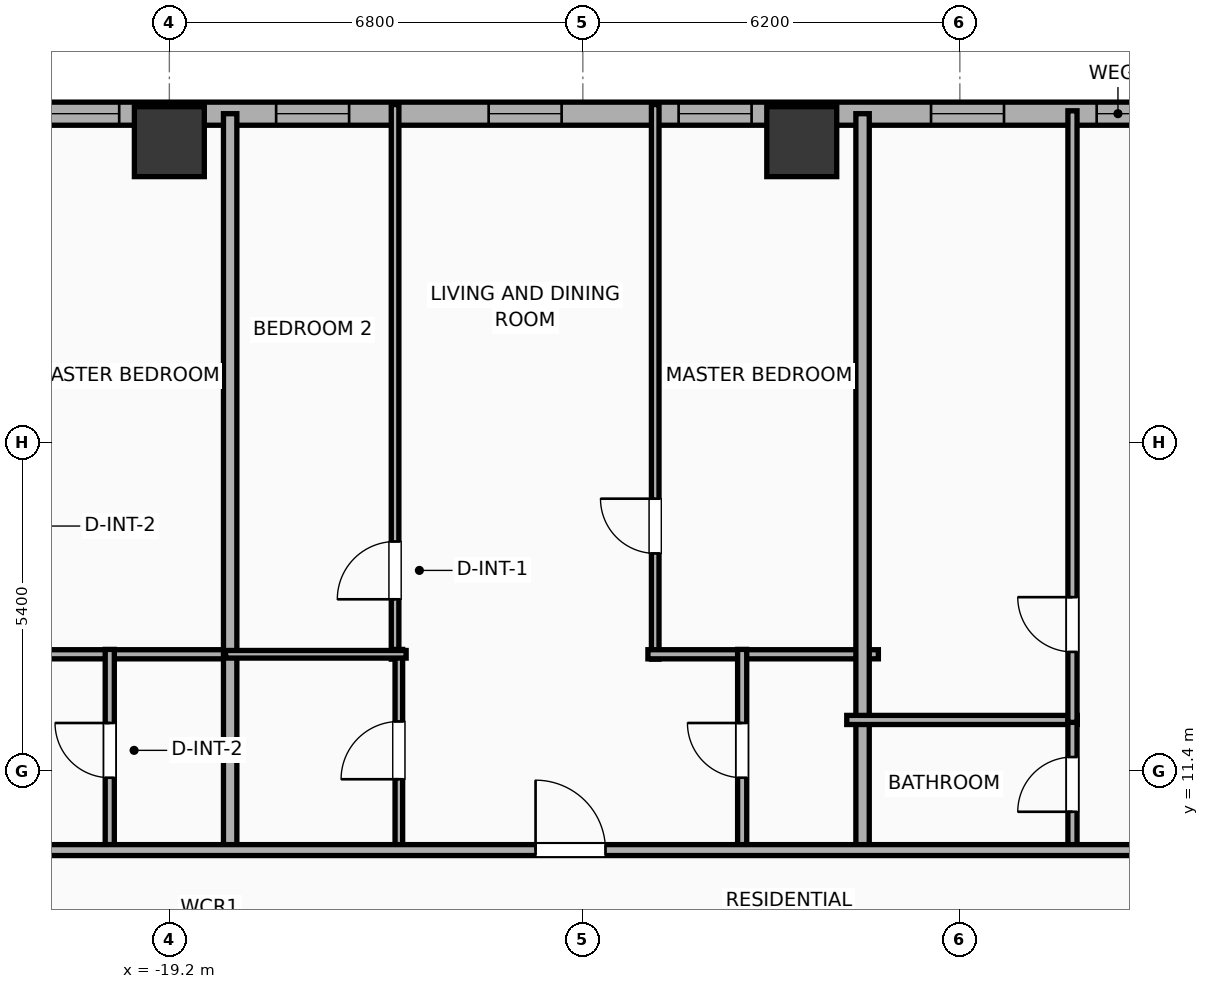
"""IFC4 building model, lengths in metres.
Left out: names, types, materials, properties, quantities, classifications, styles, units other than length and angle.
Written with IfcOpenShell. Run it as: python <this file> out.ifc"""

import sys

from ifc_helpers import new_model, si_unit, direction, frame, frame_2d, origin, origin_2d, place, context, subcontext, project, spatial, rectangle, hollow_rectangle, extrude, element, fill, save


model = new_model("IFC4")
c1 = context("Model", 3, precision=1e-05, world=origin(), true_north=direction((0.0, 1.0)))
c2 = subcontext(c1, "Body", "Model", "MODEL_VIEW")
j1 = project(units=[si_unit("LENGTHUNIT", "METRE"), si_unit("PLANEANGLEUNIT", "RADIAN")], contexts=[c1])
p1 = place(None, origin())
s1 = spatial("IfcSite", under=j1, at=p1, CompositionType="ELEMENT")
p2 = place(p1, origin())
s2 = spatial("IfcBuilding", under=s1, at=p2, CompositionType="ELEMENT")
p3 = place(p2, frame((0.0, 0.0, 37.7)))
s3 = spatial("IfcBuildingStorey", under=s2, at=p3, CompositionType="ELEMENT", Elevation=37.7)
for number, where, z_axis, x_axis in (
    (1, (-8.8, 21.75, 0.0), (0.0, 0.0, 1.0), (1.0, 0.0, 0.0)),
    (2, (-19.2, 21.75, 0.0), (0.0, 0.0, 1.0), (1.0, 0.0, 0.0)),
):
    element("IfcColumn", number, at=place(p3, frame(where, z_axis=z_axis, x_axis=x_axis)), inside=s3, PredefinedType="COLUMN", context=c2, shape_type="SweptSolid", body=[
        extrude(hollow_rectangle(XDim=1.15, YDim=1.15, WallThickness=0.04, at=origin_2d()), origin(), (0.0, 0.0, 1.0), 3.9),
    ])
p4 = place(p3, frame((-29.581, 22.21, 0.0), z_axis=(0.0, 0.0, 1.0), x_axis=(1.0, 0.0, 0.0)))
e3 = element("IfcWall", 3, at=p4, inside=s3, PredefinedType="ELEMENTEDWALL", context=c2, shape_type="SweptSolid", body=[
    extrude(rectangle(XDim=51.963, YDim=0.38, at=frame_2d((25.981, 0.0))), origin(), (0.0, 0.0, 1.0), 3.65),
])
p5 = place(p4, frame((25.631, 0.0, 0.75)))
e4 = element("IfcOpeningElement", 4, at=p5, cuts=e3, PredefinedType="OPENING", context=c2, shape_type="SweptSolid", body=[
    extrude(rectangle(XDim=2.4, YDim=2.1, at=frame_2d((1.2, 1.05))), frame((0.0, 0.2, 0.0), z_axis=(0.0, -1.0, 0.0), x_axis=(1.0, 0.0, 0.0)), (0.0, 0.0, 1.0), 0.4),
])
p6 = place(p4, frame((42.952, 0.0, 0.75)))
e5 = element("IfcOpeningElement", 5, at=p6, cuts=e3, PredefinedType="OPENING", context=c2, shape_type="SweptSolid", body=[
    extrude(rectangle(XDim=2.4, YDim=2.1, at=frame_2d((1.2, 1.05))), frame((0.0, 0.2, 0.0), z_axis=(0.0, -1.0, 0.0), x_axis=(1.0, 0.0, 0.0)), (0.0, 0.0, 1.0), 0.4),
])
p7 = place(p4, frame((1.731, 0.0, 0.75)))
e6 = element("IfcOpeningElement", 6, at=p7, cuts=e3, PredefinedType="OPENING", context=c2, shape_type="SweptSolid", body=[
    extrude(rectangle(XDim=1.2, YDim=2.05, at=frame_2d((0.6, 1.025))), frame((0.0, 0.2, 0.0), z_axis=(0.0, -1.0, 0.0), x_axis=(1.0, 0.0, 0.0)), (0.0, 0.0, 1.0), 0.4),
])
p8 = place(p4, frame((5.272, 0.0, 0.75)))
e7 = element("IfcOpeningElement", 7, at=p8, cuts=e3, PredefinedType="OPENING", context=c2, shape_type="SweptSolid", body=[
    extrude(rectangle(XDim=1.2, YDim=2.05, at=frame_2d((0.6, 1.025))), frame((0.0, 0.2, 0.0), z_axis=(0.0, -1.0, 0.0), x_axis=(1.0, 0.0, 0.0)), (0.0, 0.0, 1.0), 0.4),
])
p9 = place(p4, frame((8.356, 0.0, 0.75)))
e8 = element("IfcOpeningElement", 8, at=p9, cuts=e3, PredefinedType="OPENING", context=c2, shape_type="SweptSolid", body=[
    extrude(rectangle(XDim=1.2, YDim=2.05, at=frame_2d((0.6, 1.025))), frame((0.0, 0.2, 0.0), z_axis=(0.0, -1.0, 0.0), x_axis=(1.0, 0.0, 0.0)), (0.0, 0.0, 1.0), 0.4),
])
p10 = place(p4, frame((15.632, 0.0, 0.75)))
e9 = element("IfcOpeningElement", 9, at=p10, cuts=e3, PredefinedType="OPENING", context=c2, shape_type="SweptSolid", body=[
    extrude(rectangle(XDim=1.2, YDim=2.05, at=frame_2d((0.6, 1.025))), frame((0.0, 0.2, 0.0), z_axis=(0.0, -1.0, 0.0), x_axis=(1.0, 0.0, 0.0)), (0.0, 0.0, 1.0), 0.4),
])
p11 = place(p4, frame((12.137, 0.0, 0.75)))
e10 = element("IfcOpeningElement", 10, at=p11, cuts=e3, PredefinedType="OPENING", context=c2, shape_type="SweptSolid", body=[
    extrude(rectangle(XDim=1.2, YDim=2.05, at=frame_2d((0.6, 1.025))), frame((0.0, 0.2, 0.0), z_axis=(0.0, -1.0, 0.0), x_axis=(1.0, 0.0, 0.0)), (0.0, 0.0, 1.0), 0.4),
])
p12 = place(p4, frame((18.756, 0.0, 0.75)))
e11 = element("IfcOpeningElement", 11, at=p12, cuts=e3, PredefinedType="OPENING", context=c2, shape_type="SweptSolid", body=[
    extrude(rectangle(XDim=1.2, YDim=2.05, at=frame_2d((0.6, 1.025))), frame((0.0, 0.2, 0.0), z_axis=(0.0, -1.0, 0.0), x_axis=(1.0, 0.0, 0.0)), (0.0, 0.0, 1.0), 0.4),
])
p13 = place(p4, frame((22.907, 0.0, 0.75)))
e12 = element("IfcOpeningElement", 12, at=p13, cuts=e3, PredefinedType="OPENING", context=c2, shape_type="SweptSolid", body=[
    extrude(rectangle(XDim=1.2, YDim=2.05, at=frame_2d((0.6, 1.025))), frame((0.0, 0.2, 0.0), z_axis=(0.0, -1.0, 0.0), x_axis=(1.0, 0.0, 0.0)), (0.0, 0.0, 1.0), 0.4),
])
p14 = place(p4, frame((36.381, 0.0, 0.75)))
e13 = element("IfcOpeningElement", 13, at=p14, cuts=e3, PredefinedType="OPENING", context=c2, shape_type="SweptSolid", body=[
    extrude(rectangle(XDim=1.2, YDim=2.05, at=frame_2d((0.6, 1.025))), frame((0.0, 0.2, 0.0), z_axis=(0.0, -1.0, 0.0), x_axis=(1.0, 0.0, 0.0)), (0.0, 0.0, 1.0), 0.4),
])
p15 = place(p4, frame((32.886, 0.0, 0.75)))
e14 = element("IfcOpeningElement", 14, at=p15, cuts=e3, PredefinedType="OPENING", context=c2, shape_type="SweptSolid", body=[
    extrude(rectangle(XDim=1.2, YDim=2.05, at=frame_2d((0.6, 1.025))), frame((0.0, 0.2, 0.0), z_axis=(0.0, -1.0, 0.0), x_axis=(1.0, 0.0, 0.0)), (0.0, 0.0, 1.0), 0.4),
])
p16 = place(p4, frame((39.556, 0.0, 0.75)))
e15 = element("IfcOpeningElement", 15, at=p16, cuts=e3, PredefinedType="OPENING", context=c2, shape_type="SweptSolid", body=[
    extrude(rectangle(XDim=1.2, YDim=2.05, at=frame_2d((0.6, 1.025))), frame((0.0, 0.2, 0.0), z_axis=(0.0, -1.0, 0.0), x_axis=(1.0, 0.0, 0.0)), (0.0, 0.0, 1.0), 0.4),
])
p17 = place(p4, frame((46.885, 0.0, 0.75)))
e16 = element("IfcOpeningElement", 16, at=p17, cuts=e3, PredefinedType="OPENING", context=c2, shape_type="SweptSolid", body=[
    extrude(rectangle(XDim=1.2, YDim=2.05, at=frame_2d((0.6, 1.025))), frame((0.0, 0.2, 0.0), z_axis=(0.0, -1.0, 0.0), x_axis=(1.0, 0.0, 0.0)), (0.0, 0.0, 1.0), 0.4),
])
p18 = place(p4, frame((49.531, 0.0, 0.75)))
e17 = element("IfcOpeningElement", 17, at=p18, cuts=e3, PredefinedType="OPENING", context=c2, shape_type="SweptSolid", body=[
    extrude(rectangle(XDim=1.2, YDim=2.05, at=frame_2d((0.6, 1.025))), frame((0.0, 0.2, 0.0), z_axis=(0.0, -1.0, 0.0), x_axis=(1.0, 0.0, 0.0)), (0.0, 0.0, 1.0), 0.4),
])
p19 = place(p3, frame((-21.73, 13.32, 0.0), z_axis=(0.0, 0.0, 1.0), x_axis=(1.0, 0.0, 0.0)))
e18 = element("IfcWall", 18, at=p19, inside=s3, PredefinedType="PLUMBINGWALL", context=c2, shape_type="SweptSolid", body=[
    extrude(rectangle(XDim=3.605, YDim=0.15, at=frame_2d((1.802, 0.0))), origin(), (0.0, 0.0, 1.0), 3.65),
])
p20 = place(p3, frame((-20.18, 10.08, 0.0), z_axis=(0.0, 0.0, 1.0), x_axis=(0.0, 1.0, 0.0)))
e19 = element("IfcWall", 19, at=p20, inside=s3, PredefinedType="PLUMBINGWALL", context=c2, shape_type="SweptSolid", body=[
    extrude(rectangle(XDim=3.32, YDim=0.15, at=frame_2d((1.66, 0.0))), origin(), (0.0, 0.0, 1.0), 3.65),
])
p21 = place(p20, frame((1.21, 0.0, 0.0)))
e20 = element("IfcOpeningElement", 20, at=p21, cuts=e19, PredefinedType="OPENING", context=c2, shape_type="SweptSolid", body=[
    extrude(rectangle(XDim=0.9, YDim=2.05, at=frame_2d((0.45, 1.025))), frame((0.0, 0.085, 0.0), z_axis=(0.0, -1.0, 0.0), x_axis=(1.0, 0.0, 0.0)), (0.0, 0.0, 1.0), 0.17),
])
p22 = place(p3, frame((-18.2, 10.02, 0.0), z_axis=(0.0, 0.0, 1.0), x_axis=(0.0, 1.0, 0.0)))
e21 = element("IfcWall", 21, at=p22, inside=s3, PredefinedType="PARTITIONING", context=c2, shape_type="SweptSolid", body=[
    extrude(rectangle(XDim=12.19, YDim=0.22, at=frame_2d((6.095, 0.0))), origin(), (0.0, 0.0, 1.0), 3.65),
])
p23 = place(p3, frame((-15.488, 13.24, 0.0), z_axis=(0.0, 0.0, 1.0), x_axis=(0.0, 1.0, 0.0)))
e22 = element("IfcWall", 22, at=p23, inside=s3, PredefinedType="PARTITIONING", context=c2, shape_type="SweptSolid", body=[
    extrude(rectangle(XDim=9.12, YDim=0.125, at=frame_2d((4.56, 0.0))), origin(), (0.0, 0.0, 1.0), 3.65),
])
p24 = place(p23, frame((0.984, 0.0, 0.0)))
e23 = element("IfcOpeningElement", 23, at=p24, cuts=e22, PredefinedType="OPENING", context=c2, shape_type="SweptSolid", body=[
    extrude(rectangle(XDim=0.95, YDim=2.05, at=frame_2d((0.475, 1.025))), frame((0.0, 0.073, 0.0), z_axis=(0.0, -1.0, 0.0), x_axis=(1.0, 0.0, 0.0)), (0.0, 0.0, 1.0), 0.145),
])
p25 = place(p3, frame((-11.21, 13.24, 0.0), z_axis=(0.0, 0.0, 1.0), x_axis=(0.0, 1.0, 0.0)))
e24 = element("IfcWall", 24, at=p25, inside=s3, PredefinedType="PARTITIONING", context=c2, shape_type="SweptSolid", body=[
    extrude(rectangle(XDim=9.12, YDim=0.125, at=frame_2d((4.56, 0.0))), origin(), (0.0, 0.0, 1.0), 3.65),
])
p26 = place(p25, frame((1.739, 0.0, 0.0)))
e25 = element("IfcOpeningElement", 25, at=p26, cuts=e24, PredefinedType="OPENING", context=c2, shape_type="SweptSolid", body=[
    extrude(rectangle(XDim=0.9, YDim=2.05, at=frame_2d((0.45, 1.025))), frame((0.0, 0.073, 0.0), z_axis=(0.0, -1.0, 0.0), x_axis=(1.0, 0.0, 0.0)), (0.0, 0.0, 1.0), 0.145),
])
p27 = place(p3, frame((-11.33, 13.32, 0.0), z_axis=(0.0, 0.0, 1.0), x_axis=(1.0, 0.0, 0.0)))
e26 = element("IfcWall", 26, at=p27, inside=s3, PredefinedType="PLUMBINGWALL", context=c2, shape_type="SweptSolid", body=[
    extrude(rectangle(XDim=3.79, YDim=0.15, at=frame_2d((1.895, 0.0))), origin(), (0.0, 0.0, 1.0), 3.65),
])
p28 = place(p3, frame((-15.426, 10.08, 0.0), z_axis=(0.0, 0.0, 1.0), x_axis=(0.0, 1.0, 0.0)))
e27 = element("IfcWall", 27, at=p28, inside=s3, PredefinedType="PARTITIONING", context=c2, shape_type="SweptSolid", body=[
    extrude(rectangle(XDim=3.32, YDim=0.125, at=frame_2d((1.66, 0.0))), origin(), (0.0, 0.0, 1.0), 3.65),
])
p29 = place(p28, frame((1.185, 0.0, 0.0)))
e28 = element("IfcOpeningElement", 28, at=p29, cuts=e27, PredefinedType="OPENING", context=c2, shape_type="SweptSolid", body=[
    extrude(rectangle(XDim=0.95, YDim=2.05, at=frame_2d((0.475, 1.025))), frame((0.0, 0.073, 0.0), z_axis=(0.0, -1.0, 0.0), x_axis=(1.0, 0.0, 0.0)), (0.0, 0.0, 1.0), 0.145),
])
p30 = place(p3, frame((-18.275, 13.32, 0.0), z_axis=(0.0, 0.0, 1.0), x_axis=(1.0, 0.0, 0.0)))
e29 = element("IfcWall", 29, at=p30, inside=s3, PredefinedType="PARTITIONING", context=c2, shape_type="SweptSolid", body=[
    extrude(rectangle(XDim=2.969, YDim=0.125, at=frame_2d((1.484, 0.0))), origin(), (0.0, 0.0, 1.0), 3.65),
])
p31 = place(p3, frame((-9.78, 10.08, 0.0), z_axis=(0.0, 0.0, 1.0), x_axis=(0.0, 1.0, 0.0)))
e30 = element("IfcWall", 30, at=p31, inside=s3, PredefinedType="PLUMBINGWALL", context=c2, shape_type="SweptSolid", body=[
    extrude(rectangle(XDim=3.32, YDim=0.15, at=frame_2d((1.66, 0.0))), origin(), (0.0, 0.0, 1.0), 3.65),
])
p32 = place(p31, frame((1.21, 0.0, 0.0)))
e31 = element("IfcOpeningElement", 31, at=p32, cuts=e30, PredefinedType="OPENING", context=c2, shape_type="SweptSolid", body=[
    extrude(rectangle(XDim=0.9, YDim=2.05, at=frame_2d((0.45, 1.025))), frame((0.0, 0.085, 0.0), z_axis=(0.0, -1.0, 0.0), x_axis=(1.0, 0.0, 0.0)), (0.0, 0.0, 1.0), 0.17),
])
p33 = place(p3, frame((-7.8, 10.02, 0.0), z_axis=(0.0, 0.0, 1.0), x_axis=(0.0, 1.0, 0.0)))
e32 = element("IfcWall", 32, at=p33, inside=s3, PredefinedType="PARTITIONING", context=c2, shape_type="SweptSolid", body=[
    extrude(rectangle(XDim=12.19, YDim=0.22, at=frame_2d((6.095, 0.0))), origin(), (0.0, 0.0, 1.0), 3.65),
])
p34 = place(p3, frame((-8.06, 12.24, 0.0), z_axis=(0.0, 0.0, 1.0), x_axis=(1.0, 0.0, 0.0)))
e33 = element("IfcWall", 33, at=p34, inside=s3, PredefinedType="PLUMBINGWALL", context=c2, shape_type="SweptSolid", body=[
    extrude(rectangle(XDim=3.792, YDim=0.15, at=frame_2d((1.896, 0.0))), origin(), (0.0, 0.0, 1.0), 3.65),
])
p35 = place(p3, frame((-4.348, 10.08, 0.0), z_axis=(0.0, 0.0, 1.0), x_axis=(0.0, 1.0, 0.0)))
e34 = element("IfcWall", 34, at=p35, inside=s3, PredefinedType="PLUMBINGWALL", context=c2, shape_type="SweptSolid", body=[
    extrude(rectangle(XDim=2.2, YDim=0.15, at=frame_2d((1.1, 0.0))), origin(), (0.0, 0.0, 1.0), 3.65),
])
p36 = place(p35, frame((0.65, 0.0, 0.0)))
e35 = element("IfcOpeningElement", 35, at=p36, cuts=e34, PredefinedType="OPENING", context=c2, shape_type="SweptSolid", body=[
    extrude(rectangle(XDim=0.9, YDim=2.05, at=frame_2d((0.45, 1.025))), frame((0.0, 0.085, 0.0), z_axis=(0.0, -1.0, 0.0), x_axis=(1.0, 0.0, 0.0)), (0.0, 0.0, 1.0), 0.17),
])
p37 = place(p3, frame((-4.348, 12.2, 0.0), z_axis=(0.0, 0.0, 1.0), x_axis=(0.0, 1.0, 0.0)))
e36 = element("IfcWall", 36, at=p37, inside=s3, PredefinedType="PLUMBINGWALL", context=c2, shape_type="SweptSolid", body=[
    extrude(rectangle(XDim=10.058, YDim=0.15, at=frame_2d((5.029, 0.0))), origin(), (0.0, 0.0, 1.0), 3.65),
])
p38 = place(p37, frame((1.159, 0.0, 0.0)))
e37 = element("IfcOpeningElement", 37, at=p38, cuts=e36, PredefinedType="OPENING", context=c2, shape_type="SweptSolid", body=[
    extrude(rectangle(XDim=0.9, YDim=2.05, at=frame_2d((0.45, 1.025))), frame((0.0, 0.085, 0.0), z_axis=(0.0, -1.0, 0.0), x_axis=(1.0, 0.0, 0.0)), (0.0, 0.0, 1.0), 0.17),
])
p39 = place(p3, frame((-33.41, 10.1, 0.0), z_axis=(0.0, 0.0, 1.0), x_axis=(1.0, 0.0, 0.0)))
e38 = element("IfcWall", 38, at=p39, inside=s3, PredefinedType="PARTITIONING", context=c2, shape_type="SweptSolid", body=[
    extrude(rectangle(XDim=59.62, YDim=0.18, at=frame_2d((29.81, 0.0))), origin(), (0.0, 0.0, 1.0), 3.65),
])
p40 = place(p39, frame((3.354, 0.0, 0.0)))
e39 = element("IfcOpeningElement", 39, at=p40, cuts=e38, PredefinedType="OPENING", context=c2, shape_type="SweptSolid", body=[
    extrude(rectangle(XDim=1.15, YDim=2.05, at=frame_2d((0.575, 1.025))), frame((0.0, 0.1, 0.0), z_axis=(0.0, -1.0, 0.0), x_axis=(1.0, 0.0, 0.0)), (0.0, 0.0, 1.0), 0.2),
])
p41 = place(p39, frame((10.997, 0.0, 0.0)))
e40 = element("IfcOpeningElement", 40, at=p41, cuts=e38, PredefinedType="OPENING", context=c2, shape_type="SweptSolid", body=[
    extrude(rectangle(XDim=1.15, YDim=2.05, at=frame_2d((0.575, 1.025))), frame((0.0, 0.1, 0.0), z_axis=(0.0, -1.0, 0.0), x_axis=(1.0, 0.0, 0.0)), (0.0, 0.0, 1.0), 0.2),
])
p42 = place(p39, frame((20.232, 0.0, 0.0)))
e41 = element("IfcOpeningElement", 41, at=p42, cuts=e38, PredefinedType="OPENING", context=c2, shape_type="SweptSolid", body=[
    extrude(rectangle(XDim=1.15, YDim=2.05, at=frame_2d((0.575, 1.025))), frame((0.0, 0.1, 0.0), z_axis=(0.0, -1.0, 0.0), x_axis=(1.0, 0.0, 0.0)), (0.0, 0.0, 1.0), 0.2),
])
p43 = place(p39, frame((30.38, 0.0, 0.0)))
e42 = element("IfcOpeningElement", 42, at=p43, cuts=e38, PredefinedType="OPENING", context=c2, shape_type="SweptSolid", body=[
    extrude(rectangle(XDim=1.15, YDim=2.05, at=frame_2d((0.575, 1.025))), frame((0.0, 0.1, 0.0), z_axis=(0.0, -1.0, 0.0), x_axis=(1.0, 0.0, 0.0)), (0.0, 0.0, 1.0), 0.2),
])
p44 = place(p39, frame((40.998, 0.0, 0.0)))
e43 = element("IfcOpeningElement", 43, at=p44, cuts=e38, PredefinedType="OPENING", context=c2, shape_type="SweptSolid", body=[
    extrude(rectangle(XDim=1.15, YDim=2.05, at=frame_2d((0.575, 1.025))), frame((0.0, 0.1, 0.0), z_axis=(0.0, -1.0, 0.0), x_axis=(1.0, 0.0, 0.0)), (0.0, 0.0, 1.0), 0.2),
])
p45 = place(p39, frame((49.428, 0.0, 0.0)))
e44 = element("IfcOpeningElement", 44, at=p45, cuts=e38, PredefinedType="OPENING", context=c2, shape_type="SweptSolid", body=[
    extrude(rectangle(XDim=0.9, YDim=2.05, at=frame_2d((0.45, 1.025))), frame((0.0, 0.1, 0.0), z_axis=(0.0, -1.0, 0.0), x_axis=(1.0, 0.0, 0.0)), (0.0, 0.0, 1.0), 0.2),
])
p46 = place(p39, frame((56.07, 0.0, 0.0)))
e45 = element("IfcOpeningElement", 45, at=p46, cuts=e38, PredefinedType="OPENING", context=c2, shape_type="SweptSolid", body=[
    extrude(rectangle(XDim=0.9, YDim=2.05, at=frame_2d((0.45, 1.025))), frame((0.0, 0.1, 0.0), z_axis=(0.0, -1.0, 0.0), x_axis=(1.0, 0.0, 0.0)), (0.0, 0.0, 1.0), 0.2),
])
p47 = place(p5, origin())
e46 = element("IfcWindow", 46, at=p47, inside=s3, PartitioningType="SINGLE_PANEL", PredefinedType="WINDOW", context=c2, shape_type="SweptSolid", body=[
    extrude(rectangle(XDim=2.4, YDim=2.1, at=frame_2d((1.2, 1.05))), frame((0.0, 0.03, 0.0), z_axis=(0.0, -1.0, 0.0), x_axis=(1.0, 0.0, 0.0)), (0.0, 0.0, 1.0), 0.06),
])
fill(e4, e46)
p48 = place(p9, origin())
e47 = element("IfcWindow", 47, at=p48, inside=s3, PartitioningType="SINGLE_PANEL", PredefinedType="WINDOW", context=c2, shape_type="SweptSolid", body=[
    extrude(rectangle(XDim=1.2, YDim=2.05, at=frame_2d((0.6, 1.025))), frame((0.0, 0.03, 0.0), z_axis=(0.0, -1.0, 0.0), x_axis=(1.0, 0.0, 0.0)), (0.0, 0.0, 1.0), 0.06),
])
fill(e8, e47)
p49 = place(p10, origin())
e48 = element("IfcWindow", 48, at=p49, inside=s3, PartitioningType="SINGLE_PANEL", PredefinedType="WINDOW", context=c2, shape_type="SweptSolid", body=[
    extrude(rectangle(XDim=1.2, YDim=2.05, at=frame_2d((0.6, 1.025))), frame((0.0, 0.03, 0.0), z_axis=(0.0, -1.0, 0.0), x_axis=(1.0, 0.0, 0.0)), (0.0, 0.0, 1.0), 0.06),
])
fill(e9, e48)
p50 = place(p11, origin())
e49 = element("IfcWindow", 49, at=p50, inside=s3, PartitioningType="SINGLE_PANEL", PredefinedType="WINDOW", context=c2, shape_type="SweptSolid", body=[
    extrude(rectangle(XDim=1.2, YDim=2.05, at=frame_2d((0.6, 1.025))), frame((0.0, 0.03, 0.0), z_axis=(0.0, -1.0, 0.0), x_axis=(1.0, 0.0, 0.0)), (0.0, 0.0, 1.0), 0.06),
])
fill(e10, e49)
p51 = place(p12, origin())
e50 = element("IfcWindow", 50, at=p51, inside=s3, PartitioningType="SINGLE_PANEL", PredefinedType="WINDOW", context=c2, shape_type="SweptSolid", body=[
    extrude(rectangle(XDim=1.2, YDim=2.05, at=frame_2d((0.6, 1.025))), frame((0.0, 0.03, 0.0), z_axis=(0.0, -1.0, 0.0), x_axis=(1.0, 0.0, 0.0)), (0.0, 0.0, 1.0), 0.06),
])
fill(e11, e50)
p52 = place(p13, origin())
e51 = element("IfcWindow", 51, at=p52, inside=s3, PartitioningType="SINGLE_PANEL", PredefinedType="WINDOW", context=c2, shape_type="SweptSolid", body=[
    extrude(rectangle(XDim=1.2, YDim=2.05, at=frame_2d((0.6, 1.025))), frame((0.0, 0.03, 0.0), z_axis=(0.0, -1.0, 0.0), x_axis=(1.0, 0.0, 0.0)), (0.0, 0.0, 1.0), 0.06),
])
fill(e12, e51)
p53 = place(p21, origin())
e52 = element("IfcDoor", 52, at=p53, inside=s3, OperationType="SINGLE_SWING_RIGHT", PredefinedType="DOOR", context=c2, shape_type="SweptSolid", body=[
    extrude(rectangle(XDim=0.9, YDim=2.05, at=frame_2d((0.45, 1.025))), frame((0.0, 0.025, 0.0), z_axis=(0.0, -1.0, 0.0), x_axis=(1.0, 0.0, 0.0)), (0.0, 0.0, 1.0), 0.05),
])
fill(e20, e52)
p54 = place(p24, origin())
e53 = element("IfcDoor", 53, at=p54, inside=s3, OperationType="SINGLE_SWING_LEFT", PredefinedType="DOOR", context=c2, shape_type="SweptSolid", body=[
    extrude(rectangle(XDim=0.95, YDim=2.05, at=frame_2d((0.475, 1.025))), frame((0.0, 0.025, 0.0), z_axis=(0.0, -1.0, 0.0), x_axis=(1.0, 0.0, 0.0)), (0.0, 0.0, 1.0), 0.05),
])
fill(e23, e53)
p55 = place(p26, origin())
e54 = element("IfcDoor", 54, at=p55, inside=s3, OperationType="SINGLE_SWING_RIGHT", PredefinedType="DOOR", context=c2, shape_type="SweptSolid", body=[
    extrude(rectangle(XDim=0.9, YDim=2.05, at=frame_2d((0.45, 1.025))), frame((0.0, 0.025, 0.0), z_axis=(0.0, -1.0, 0.0), x_axis=(1.0, 0.0, 0.0)), (0.0, 0.0, 1.0), 0.05),
])
fill(e25, e54)
p56 = place(p29, origin())
e55 = element("IfcDoor", 55, at=p56, inside=s3, OperationType="SINGLE_SWING_LEFT", PredefinedType="DOOR", context=c2, shape_type="SweptSolid", body=[
    extrude(rectangle(XDim=0.95, YDim=2.05, at=frame_2d((0.475, 1.025))), frame((0.0, 0.025, 0.0), z_axis=(0.0, -1.0, 0.0), x_axis=(1.0, 0.0, 0.0)), (0.0, 0.0, 1.0), 0.05),
])
fill(e28, e55)
p57 = place(p32, origin())
e56 = element("IfcDoor", 56, at=p57, inside=s3, OperationType="SINGLE_SWING_RIGHT", PredefinedType="DOOR", context=c2, shape_type="SweptSolid", body=[
    extrude(rectangle(XDim=0.9, YDim=2.05, at=frame_2d((0.45, 1.025))), frame((0.0, 0.025, 0.0), z_axis=(0.0, -1.0, 0.0), x_axis=(1.0, 0.0, 0.0)), (0.0, 0.0, 1.0), 0.05),
])
fill(e31, e56)
p58 = place(p36, origin())
e57 = element("IfcDoor", 57, at=p58, inside=s3, OperationType="SINGLE_SWING_LEFT", PredefinedType="DOOR", context=c2, shape_type="SweptSolid", body=[
    extrude(rectangle(XDim=0.9, YDim=2.05, at=frame_2d((0.45, 1.025))), frame((0.0, 0.025, 0.0), z_axis=(0.0, -1.0, 0.0), x_axis=(1.0, 0.0, 0.0)), (0.0, 0.0, 1.0), 0.05),
])
fill(e35, e57)
p59 = place(p38, origin())
e58 = element("IfcDoor", 58, at=p59, inside=s3, OperationType="SINGLE_SWING_RIGHT", PredefinedType="DOOR", context=c2, shape_type="SweptSolid", body=[
    extrude(rectangle(XDim=0.9, YDim=2.05, at=frame_2d((0.45, 1.025))), frame((0.0, 0.025, 0.0), z_axis=(0.0, -1.0, 0.0), x_axis=(1.0, 0.0, 0.0)), (0.0, 0.0, 1.0), 0.05),
])
fill(e37, e58)
p60 = place(p42, origin())
e59 = element("IfcDoor", 59, at=p60, inside=s3, OperationType="SINGLE_SWING_LEFT", PredefinedType="DOOR", context=c2, shape_type="SweptSolid", body=[
    extrude(rectangle(XDim=1.15, YDim=2.05, at=frame_2d((0.575, 1.025))), frame((0.0, 0.025, 0.0), z_axis=(0.0, -1.0, 0.0), x_axis=(1.0, 0.0, 0.0)), (0.0, 0.0, 1.0), 0.05),
])
fill(e41, e59)
save(model, sys.argv[1])
